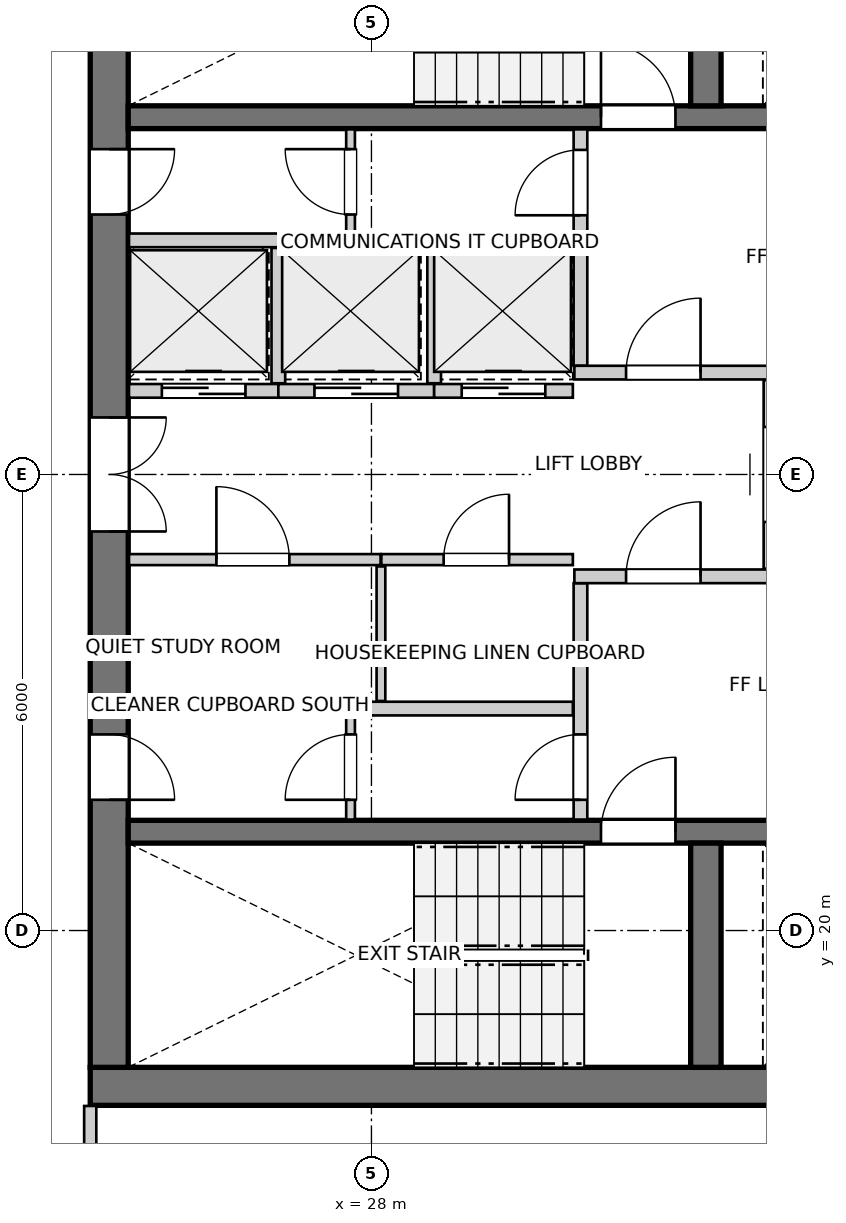
"""IFC4 building model, lengths in metres.
Left out: names, types, materials, properties, quantities, classifications, styles, units other than length and angle.
Written with IfcOpenShell. Run it as: python <this file> out.ifc"""

import sys

from ifc_helpers import new_model, si_unit, direction, frame, frame_2d, origin, place, context, subcontext, project, spatial, rectangle, extrude, source, transform, mapped, element, fill, save


model = new_model("IFC4")
c1 = context("Model", 3, precision=1e-05, world=origin(), true_north=direction((0.0, 1.0)))
c2 = subcontext(c1, "Body", "Model", "MODEL_VIEW")
j1 = project(units=[si_unit("LENGTHUNIT", "METRE"), si_unit("PLANEANGLEUNIT", "RADIAN")], contexts=[c1])
p1 = place(None, origin())
s1 = spatial("IfcSite", under=j1, at=p1, CompositionType="ELEMENT")
p2 = place(p1, origin())
s2 = spatial("IfcBuilding", under=s1, at=p2, CompositionType="ELEMENT")
p3 = place(p2, frame((0.0, 0.0, 208.4)))
s3 = spatial("IfcBuildingStorey", under=s2, at=p3, CompositionType="ELEMENT", Elevation=208.4)
p4 = place(p3, frame((24.3, 17.95, 0.0), z_axis=(0.0, 0.0, 1.0), x_axis=(1.0, 0.0, 0.0)))
e1 = element("IfcWall", 1, at=p4, inside=s3, PredefinedType="SHEAR", context=c2, shape_type="SweptSolid", body=[
    extrude(rectangle(XDim=12.1, YDim=0.5, at=frame_2d((6.05, 0.0))), origin(), (0.0, 0.0, 1.0), 2.935),
])
p5 = place(p3, frame((24.55, 33.8, 0.0), z_axis=(0.0, 0.0, 1.0), x_axis=(0.0, -1.0, 0.0)))
e2 = element("IfcWall", 2, at=p5, inside=s3, PredefinedType="SHEAR", context=c2, shape_type="SweptSolid", body=[
    extrude(rectangle(XDim=15.6, YDim=0.5, at=frame_2d((7.8, 0.0))), origin(), (0.0, 0.0, 1.0), 2.935),
])
p6 = place(p5, frame((7.05, 0.0, 0.0)))
e3 = element("IfcOpeningElement", 3, at=p6, cuts=e2, PredefinedType="OPENING", context=c2, shape_type="SweptSolid", body=[
    extrude(rectangle(XDim=1.5, YDim=2.15, at=frame_2d((0.75, 1.075))), frame((0.0, 0.26, 0.0), z_axis=(0.0, -1.0, 0.0), x_axis=(1.0, 0.0, 0.0)), (0.0, 0.0, 1.0), 0.52),
])
p7 = place(p5, frame((3.52, 0.0, 0.0)))
e4 = element("IfcOpeningElement", 4, at=p7, cuts=e2, PredefinedType="OPENING", context=c2, shape_type="SweptSolid", body=[
    extrude(rectangle(XDim=0.86, YDim=2.05, at=frame_2d((0.43, 1.025))), frame((0.0, 0.26, 0.0), z_axis=(0.0, -1.0, 0.0), x_axis=(1.0, 0.0, 0.0)), (0.0, 0.0, 1.0), 0.52),
])
p8 = place(p5, frame((11.22, 0.0, 0.0)))
e5 = element("IfcOpeningElement", 5, at=p8, cuts=e2, PredefinedType="OPENING", context=c2, shape_type="SweptSolid", body=[
    extrude(rectangle(XDim=0.86, YDim=2.05, at=frame_2d((0.43, 1.025))), frame((0.0, 0.26, 0.0), z_axis=(0.0, -1.0, 0.0), x_axis=(1.0, 0.0, 0.0)), (0.0, 0.0, 1.0), 0.52),
])
p9 = place(p3, frame((24.8, 21.3, 0.0), z_axis=(0.0, 0.0, 1.0), x_axis=(1.0, 0.0, 0.0)))
e6 = element("IfcWall", 6, at=p9, inside=s3, PredefinedType="SHEAR", context=c2, shape_type="SweptSolid", body=[
    extrude(rectangle(XDim=11.1, YDim=0.3, at=frame_2d((5.55, 0.0))), origin(), (0.0, 0.0, 1.0), 2.935),
])
p10 = place(p9, frame((6.22, 0.0, 0.0)))
e7 = element("IfcOpeningElement", 7, at=p10, cuts=e6, PredefinedType="OPENING", context=c2, shape_type="SweptSolid", body=[
    extrude(rectangle(XDim=0.98, YDim=2.15, at=frame_2d((0.49, 1.075))), frame((0.0, 0.16, 0.0), z_axis=(0.0, -1.0, 0.0), x_axis=(1.0, 0.0, 0.0)), (0.0, 0.0, 1.0), 0.32),
])
p11 = place(p9, frame((9.15, 0.0, 0.0)))
e8 = element("IfcOpeningElement", 8, at=p11, cuts=e6, PredefinedType="OPENING", context=c2, shape_type="SweptSolid", body=[
    extrude(rectangle(XDim=1.15, YDim=2.15, at=frame_2d((0.575, 1.075))), frame((0.0, 0.16, 0.0), z_axis=(0.0, -1.0, 0.0), x_axis=(1.0, 0.0, 0.0)), (0.0, 0.0, 1.0), 0.32),
])
p12 = place(p3, frame((32.4, 18.2, 0.0), z_axis=(0.0, 0.0, 1.0), x_axis=(0.0, 1.0, 0.0)))
e9 = element("IfcWall", 9, at=p12, inside=s3, PredefinedType="SHEAR", context=c2, shape_type="SweptSolid", body=[
    extrude(rectangle(XDim=2.95, YDim=0.4, at=frame_2d((1.475, 0.0))), origin(), (0.0, 0.0, 1.0), 2.935),
])
p13 = place(p3, frame((24.8, 30.7, 0.0), z_axis=(0.0, 0.0, 1.0), x_axis=(1.0, 0.0, 0.0)))
e10 = element("IfcWall", 10, at=p13, inside=s3, PredefinedType="SHEAR", context=c2, shape_type="SweptSolid", body=[
    extrude(rectangle(XDim=11.1, YDim=0.3, at=frame_2d((5.55, 0.0))), origin(), (0.0, 0.0, 1.0), 2.935),
])
p14 = place(p13, frame((6.22, 0.0, 0.0)))
e11 = element("IfcOpeningElement", 11, at=p14, cuts=e10, PredefinedType="OPENING", context=c2, shape_type="SweptSolid", body=[
    extrude(rectangle(XDim=0.98, YDim=2.15, at=frame_2d((0.49, 1.075))), frame((0.0, 0.16, 0.0), z_axis=(0.0, -1.0, 0.0), x_axis=(1.0, 0.0, 0.0)), (0.0, 0.0, 1.0), 0.32),
])
p15 = place(p13, frame((9.15, 0.0, 0.0)))
e12 = element("IfcOpeningElement", 12, at=p15, cuts=e10, PredefinedType="OPENING", context=c2, shape_type="SweptSolid", body=[
    extrude(rectangle(XDim=1.15, YDim=2.15, at=frame_2d((0.575, 1.075))), frame((0.0, 0.16, 0.0), z_axis=(0.0, -1.0, 0.0), x_axis=(1.0, 0.0, 0.0)), (0.0, 0.0, 1.0), 0.32),
])
p16 = place(p3, frame((32.4, 30.85, 0.0), z_axis=(0.0, 0.0, 1.0), x_axis=(0.0, 1.0, 0.0)))
e13 = element("IfcWall", 13, at=p16, inside=s3, PredefinedType="SHEAR", context=c2, shape_type="SweptSolid", body=[
    extrude(rectangle(XDim=2.95, YDim=0.4, at=frame_2d((1.475, 0.0))), origin(), (0.0, 0.0, 1.0), 2.935),
])
p17 = place(p3, frame((30.75, 21.46, 0.0), z_axis=(0.0, 0.0, 1.0), x_axis=(0.0, 1.0, 0.0)))
e14 = element("IfcWall", 14, at=p17, inside=s3, PredefinedType="PARTITIONING", context=c2, shape_type="SweptSolid", body=[
    extrude(rectangle(XDim=3.11, YDim=0.18, at=frame_2d((1.555, 0.0))), origin(), (0.0, 0.0, 1.0), 2.935),
])
p18 = place(p17, frame((0.26, 0.0, 0.0)))
e15 = element("IfcOpeningElement", 15, at=p18, cuts=e14, PredefinedType="OPENING", context=c2, shape_type="SweptSolid", body=[
    extrude(rectangle(XDim=0.86, YDim=2.05, at=frame_2d((0.43, 1.025))), frame((0.0, 0.1, 0.0), z_axis=(0.0, -1.0, 0.0), x_axis=(1.0, 0.0, 0.0)), (0.0, 0.0, 1.0), 0.2),
])
p19 = place(p3, frame((30.67, 24.66, 0.0), z_axis=(0.0, 0.0, 1.0), x_axis=(1.0, 0.0, 0.0)))
e16 = element("IfcWall", 16, at=p19, inside=s3, PredefinedType="PARTITIONING", context=c2, shape_type="SweptSolid", body=[
    extrude(rectangle(XDim=5.22, YDim=0.18, at=frame_2d((2.61, 0.0))), origin(), (0.0, 0.0, 1.0), 2.935),
])
p20 = place(p19, frame((0.68, 0.0, 0.0)))
e17 = element("IfcOpeningElement", 17, at=p20, cuts=e16, PredefinedType="OPENING", context=c2, shape_type="SweptSolid", body=[
    extrude(rectangle(XDim=0.98, YDim=2.15, at=frame_2d((0.49, 1.075))), frame((0.0, 0.1, 0.0), z_axis=(0.0, -1.0, 0.0), x_axis=(1.0, 0.0, 0.0)), (0.0, 0.0, 1.0), 0.2),
])
p21 = place(p3, frame((30.75, 27.43, 0.0), z_axis=(0.0, 0.0, 1.0), x_axis=(0.0, 1.0, 0.0)))
e18 = element("IfcWall", 18, at=p21, inside=s3, PredefinedType="PARTITIONING", context=c2, shape_type="SweptSolid", body=[
    extrude(rectangle(XDim=3.11, YDim=0.18, at=frame_2d((1.555, 0.0))), origin(), (0.0, 0.0, 1.0), 2.935),
])
p22 = place(p21, frame((1.98, 0.0, 0.0)))
e19 = element("IfcOpeningElement", 19, at=p22, cuts=e18, PredefinedType="OPENING", context=c2, shape_type="SweptSolid", body=[
    extrude(rectangle(XDim=0.86, YDim=2.05, at=frame_2d((0.43, 1.025))), frame((0.0, 0.1, 0.0), z_axis=(0.0, -1.0, 0.0), x_axis=(1.0, 0.0, 0.0)), (0.0, 0.0, 1.0), 0.2),
])
p23 = place(p3, frame((30.67, 27.34, 0.0), z_axis=(0.0, 0.0, 1.0), x_axis=(1.0, 0.0, 0.0)))
e20 = element("IfcWall", 20, at=p23, inside=s3, PredefinedType="PARTITIONING", context=c2, shape_type="SweptSolid", body=[
    extrude(rectangle(XDim=5.22, YDim=0.18, at=frame_2d((2.61, 0.0))), origin(), (0.0, 0.0, 1.0), 2.935),
])
p24 = place(p23, frame((0.68, 0.0, 0.0)))
e21 = element("IfcOpeningElement", 21, at=p24, cuts=e20, PredefinedType="OPENING", context=c2, shape_type="SweptSolid", body=[
    extrude(rectangle(XDim=0.98, YDim=2.15, at=frame_2d((0.49, 1.075))), frame((0.0, 0.1, 0.0), z_axis=(0.0, -1.0, 0.0), x_axis=(1.0, 0.0, 0.0)), (0.0, 0.0, 1.0), 0.2),
])
p25 = place(p3, frame((33.25, 24.76, 0.0), z_axis=(0.0, 0.0, 1.0), x_axis=(0.0, 1.0, 0.0)))
e22 = element("IfcWall", 22, at=p25, inside=s3, PredefinedType="PARTITIONING", context=c2, shape_type="SweptSolid", body=[
    extrude(rectangle(XDim=2.48, YDim=0.18, at=frame_2d((1.24, 0.0))), origin(), (0.0, 0.0, 1.0), 2.935),
])
p26 = place(p25, frame((0.615, 0.0, 0.0)))
e23 = element("IfcOpeningElement", 23, at=p26, cuts=e22, PredefinedType="OPENING", context=c2, shape_type="SweptSolid", body=[
    extrude(rectangle(XDim=1.25, YDim=2.15, at=frame_2d((0.625, 1.075))), frame((0.0, 0.1, 0.0), z_axis=(0.0, -1.0, 0.0), x_axis=(1.0, 0.0, 0.0)), (0.0, 0.0, 1.0), 0.2),
])
p27 = place(p3, frame((24.81, 22.92, 0.0), z_axis=(0.0, 0.0, 1.0), x_axis=(1.0, 0.0, 0.0)))
e24 = element("IfcWall", 24, at=p27, inside=s3, PredefinedType="PARTITIONING", context=c2, shape_type="SweptSolid", body=[
    extrude(rectangle(XDim=5.84, YDim=0.18, at=frame_2d((2.92, 0.0))), origin(), (0.0, 0.0, 1.0), 2.935),
])
p28 = place(p3, frame((24.81, 24.88, 0.0), z_axis=(0.0, 0.0, 1.0), x_axis=(1.0, 0.0, 0.0)))
e25 = element("IfcWall", 25, at=p28, inside=s3, PredefinedType="PARTITIONING", context=c2, shape_type="SweptSolid", body=[
    extrude(rectangle(XDim=3.31, YDim=0.145, at=frame_2d((1.655, 0.0))), origin(), (0.0, 0.0, 1.0), 2.935),
])
p29 = place(p28, frame((1.15, 0.0, 0.0)))
e26 = element("IfcOpeningElement", 26, at=p29, cuts=e25, PredefinedType="OPENING", context=c2, shape_type="SweptSolid", body=[
    extrude(rectangle(XDim=0.96, YDim=2.1, at=frame_2d((0.48, 1.05))), frame((0.0, 0.083, 0.0), z_axis=(0.0, -1.0, 0.0), x_axis=(1.0, 0.0, 0.0)), (0.0, 0.0, 1.0), 0.165),
])
p30 = place(p3, frame((28.13, 24.88, 0.0), z_axis=(0.0, 0.0, 1.0), x_axis=(1.0, 0.0, 0.0)))
e27 = element("IfcWall", 27, at=p30, inside=s3, PredefinedType="PARTITIONING", context=c2, shape_type="SweptSolid", body=[
    extrude(rectangle(XDim=2.52, YDim=0.145, at=frame_2d((1.26, 0.0))), origin(), (0.0, 0.0, 1.0), 2.935),
])
p31 = place(p30, frame((0.82, 0.0, 0.0)))
e28 = element("IfcOpeningElement", 28, at=p31, cuts=e27, PredefinedType="OPENING", context=c2, shape_type="SweptSolid", body=[
    extrude(rectangle(XDim=0.86, YDim=2.05, at=frame_2d((0.43, 1.025))), frame((0.0, 0.083, 0.0), z_axis=(0.0, -1.0, 0.0), x_axis=(1.0, 0.0, 0.0)), (0.0, 0.0, 1.0), 0.165),
])
p32 = place(p3, frame((28.125, 23.02, 0.0), z_axis=(0.0, 0.0, 1.0), x_axis=(0.0, 1.0, 0.0)))
e29 = element("IfcWall", 29, at=p32, inside=s3, PredefinedType="PARTITIONING", context=c2, shape_type="SweptSolid", body=[
    extrude(rectangle(XDim=1.77, YDim=0.115, at=frame_2d((0.885, 0.0))), origin(), (0.0, 0.0, 1.0), 2.935),
])
p33 = place(p3, frame((24.81, 29.08, 0.0), z_axis=(0.0, 0.0, 1.0), x_axis=(1.0, 0.0, 0.0)))
e30 = element("IfcWall", 30, at=p33, inside=s3, PredefinedType="PARTITIONING", context=c2, shape_type="SweptSolid", body=[
    extrude(rectangle(XDim=5.84, YDim=0.18, at=frame_2d((2.92, 0.0))), origin(), (0.0, 0.0, 1.0), 2.935),
])
p34 = place(p3, frame((24.81, 27.1, 0.0), z_axis=(0.0, 0.0, 1.0), x_axis=(1.0, 0.0, 0.0)))
e31 = element("IfcWall", 31, at=p34, inside=s3, PredefinedType="PARTITIONING", context=c2, shape_type="SweptSolid", body=[
    extrude(rectangle(XDim=1.965, YDim=0.18, at=frame_2d((0.982, 0.0))), origin(), (0.0, 0.0, 1.0), 2.935),
])
p35 = place(p34, frame((0.433, 0.0, 0.0)))
e32 = element("IfcOpeningElement", 32, at=p35, cuts=e31, PredefinedType="OPENING", context=c2, shape_type="SweptSolid", body=[
    extrude(rectangle(XDim=1.1, YDim=2.15, at=frame_2d((0.55, 1.075))), frame((0.0, 0.1, 0.0), z_axis=(0.0, -1.0, 0.0), x_axis=(1.0, 0.0, 0.0)), (0.0, 0.0, 1.0), 0.2),
])
p36 = place(p3, frame((26.775, 27.1, 0.0), z_axis=(0.0, 0.0, 1.0), x_axis=(1.0, 0.0, 0.0)))
e33 = element("IfcWall", 33, at=p36, inside=s3, PredefinedType="PARTITIONING", context=c2, shape_type="SweptSolid", body=[
    extrude(rectangle(XDim=2.05, YDim=0.18, at=frame_2d((1.025, 0.0))), origin(), (0.0, 0.0, 1.0), 2.935),
])
p37 = place(p36, frame((0.475, 0.0, 0.0)))
e34 = element("IfcOpeningElement", 34, at=p37, cuts=e33, PredefinedType="OPENING", context=c2, shape_type="SweptSolid", body=[
    extrude(rectangle(XDim=1.1, YDim=2.15, at=frame_2d((0.55, 1.075))), frame((0.0, 0.1, 0.0), z_axis=(0.0, -1.0, 0.0), x_axis=(1.0, 0.0, 0.0)), (0.0, 0.0, 1.0), 0.2),
])
p38 = place(p3, frame((26.775, 27.2, 0.0), z_axis=(0.0, 0.0, 1.0), x_axis=(0.0, 1.0, 0.0)))
e35 = element("IfcWall", 35, at=p38, inside=s3, PredefinedType="PARTITIONING", context=c2, shape_type="SweptSolid", body=[
    extrude(rectangle(XDim=1.78, YDim=0.18, at=frame_2d((0.89, 0.0))), origin(), (0.0, 0.0, 1.0), 2.935),
])
p39 = place(p3, frame((28.825, 27.1, 0.0), z_axis=(0.0, 0.0, 1.0), x_axis=(1.0, 0.0, 0.0)))
e36 = element("IfcWall", 36, at=p39, inside=s3, PredefinedType="PARTITIONING", context=c2, shape_type="SweptSolid", body=[
    extrude(rectangle(XDim=1.825, YDim=0.18, at=frame_2d((0.913, 0.0))), origin(), (0.0, 0.0, 1.0), 2.935),
])
p40 = place(p39, frame((0.363, 0.0, 0.0)))
e37 = element("IfcOpeningElement", 37, at=p40, cuts=e36, PredefinedType="OPENING", context=c2, shape_type="SweptSolid", body=[
    extrude(rectangle(XDim=1.1, YDim=2.15, at=frame_2d((0.55, 1.075))), frame((0.0, 0.1, 0.0), z_axis=(0.0, -1.0, 0.0), x_axis=(1.0, 0.0, 0.0)), (0.0, 0.0, 1.0), 0.2),
])
p41 = place(p3, frame((28.825, 27.2, 0.0), z_axis=(0.0, 0.0, 1.0), x_axis=(0.0, 1.0, 0.0)))
e38 = element("IfcWall", 38, at=p41, inside=s3, PredefinedType="PARTITIONING", context=c2, shape_type="SweptSolid", body=[
    extrude(rectangle(XDim=1.78, YDim=0.18, at=frame_2d((0.89, 0.0))), origin(), (0.0, 0.0, 1.0), 2.935),
])
p42 = place(p3, frame((27.725, 21.46, 0.0), z_axis=(0.0, 0.0, 1.0), x_axis=(0.0, 1.0, 0.0)))
e39 = element("IfcWall", 39, at=p42, inside=s3, PredefinedType="PARTITIONING", context=c2, shape_type="SweptSolid", body=[
    extrude(rectangle(XDim=1.38, YDim=0.115, at=frame_2d((0.69, 0.0))), origin(), (0.0, 0.0, 1.0), 2.935),
])
p43 = place(p42, frame((0.26, 0.0, 0.0)))
e40 = element("IfcOpeningElement", 40, at=p43, cuts=e39, PredefinedType="OPENING", context=c2, shape_type="SweptSolid", body=[
    extrude(rectangle(XDim=0.86, YDim=2.05, at=frame_2d((0.43, 1.025))), frame((0.0, 0.067, 0.0), z_axis=(0.0, -1.0, 0.0), x_axis=(1.0, 0.0, 0.0)), (0.0, 0.0, 1.0), 0.135),
])
p44 = place(p3, frame((27.725, 29.16, 0.0), z_axis=(0.0, 0.0, 1.0), x_axis=(0.0, 1.0, 0.0)))
e41 = element("IfcWall", 41, at=p44, inside=s3, PredefinedType="PARTITIONING", context=c2, shape_type="SweptSolid", body=[
    extrude(rectangle(XDim=1.38, YDim=0.115, at=frame_2d((0.69, 0.0))), origin(), (0.0, 0.0, 1.0), 2.935),
])
p45 = place(p44, frame((0.26, 0.0, 0.0)))
e42 = element("IfcOpeningElement", 42, at=p45, cuts=e41, PredefinedType="OPENING", context=c2, shape_type="SweptSolid", body=[
    extrude(rectangle(XDim=0.86, YDim=2.05, at=frame_2d((0.43, 1.025))), frame((0.0, 0.067, 0.0), z_axis=(0.0, -1.0, 0.0), x_axis=(1.0, 0.0, 0.0)), (0.0, 0.0, 1.0), 0.135),
])
p46 = place(p3, frame((24.3, 15.002, 0.0), z_axis=(0.0, 0.0, 1.0), x_axis=(0.0, 1.0, 0.0)))
e43 = element("IfcWall", 43, at=p46, inside=s3, PredefinedType="PARTITIONING", context=c2, shape_type="SweptSolid", body=[
    extrude(rectangle(XDim=2.69, YDim=0.16, at=frame_2d((1.345, 0.0))), origin(), (0.0, 0.0, 1.0), 2.935),
])
m1 = source(origin(), c2, "Body", "SweptSolid", [
    extrude(rectangle(XDim=0.98, YDim=2.15, at=frame_2d((0.49, 1.075))), frame((0.0, 0.025, 0.0), z_axis=(0.0, -1.0, 0.0), x_axis=(1.0, 0.0, 0.0)), (0.0, 0.0, 1.0), 0.05),
])
p47 = place(p10, origin())
e44 = element("IfcDoor", 44, at=p47, inside=s3, OperationType="SINGLE_SWING_RIGHT", PredefinedType="DOOR", context=c2, shape_type="MappedRepresentation", body=[
    mapped(m1, transform((0.0, 0.0, 0.0), x_axis=(1.0, 0.0, 0.0), y_axis=(0.0, 1.0, 0.0), z_axis=(0.0, 0.0, 1.0), scale=1.0)),
])
fill(e7, e44)
p48 = place(p14, origin())
e45 = element("IfcDoor", 45, at=p48, inside=s3, OperationType="SINGLE_SWING_LEFT", PredefinedType="DOOR", context=c2, shape_type="MappedRepresentation", body=[
    mapped(m1, transform((0.0, 0.0, 0.0), x_axis=(1.0, 0.0, 0.0), y_axis=(0.0, 1.0, 0.0), z_axis=(0.0, 0.0, 1.0), scale=1.0)),
])
fill(e11, e45)
m2 = source(origin(), c2, "Body", "SweptSolid", [
    extrude(rectangle(XDim=1.5, YDim=2.15, at=frame_2d((0.75, 1.075))), frame((0.0, 0.025, 0.0), z_axis=(0.0, -1.0, 0.0), x_axis=(1.0, 0.0, 0.0)), (0.0, 0.0, 1.0), 0.05),
])
p49 = place(p6, origin())
e46 = element("IfcDoor", 46, at=p49, inside=s3, OperationType="DOUBLE_DOOR_SINGLE_SWING", PredefinedType="DOOR", context=c2, shape_type="MappedRepresentation", body=[
    mapped(m2, transform((0.0, 0.0, 0.0), x_axis=(1.0, 0.0, 0.0), y_axis=(0.0, 1.0, 0.0), z_axis=(0.0, 0.0, 1.0), scale=1.0)),
])
fill(e3, e46)
m3 = source(origin(), c2, "Body", "SweptSolid", [
    extrude(rectangle(XDim=0.86, YDim=2.05, at=frame_2d((0.43, 1.025))), frame((0.0, 0.025, 0.0), z_axis=(0.0, -1.0, 0.0), x_axis=(1.0, 0.0, 0.0)), (0.0, 0.0, 1.0), 0.05),
])
p50 = place(p7, origin())
e47 = element("IfcDoor", 47, at=p50, inside=s3, OperationType="SINGLE_SWING_LEFT", PredefinedType="DOOR", context=c2, shape_type="MappedRepresentation", body=[
    mapped(m3, transform((0.0, 0.0, 0.0), x_axis=(1.0, 0.0, 0.0), y_axis=(0.0, 1.0, 0.0), z_axis=(0.0, 0.0, 1.0), scale=1.0)),
])
fill(e4, e47)
p51 = place(p8, origin())
e48 = element("IfcDoor", 48, at=p51, inside=s3, OperationType="SINGLE_SWING_RIGHT", PredefinedType="DOOR", context=c2, shape_type="MappedRepresentation", body=[
    mapped(m3, transform((0.0, 0.0, 0.0), x_axis=(1.0, 0.0, 0.0), y_axis=(0.0, 1.0, 0.0), z_axis=(0.0, 0.0, 1.0), scale=1.0)),
])
fill(e5, e48)
p52 = place(p18, origin())
e49 = element("IfcDoor", 49, at=p52, inside=s3, OperationType="SINGLE_SWING_LEFT", PredefinedType="DOOR", context=c2, shape_type="MappedRepresentation", body=[
    mapped(m3, transform((0.0, 0.0, 0.0), x_axis=(1.0, 0.0, 0.0), y_axis=(0.0, 1.0, 0.0), z_axis=(0.0, 0.0, 1.0), scale=1.0)),
])
fill(e15, e49)
p53 = place(p20, origin())
e50 = element("IfcDoor", 50, at=p53, inside=s3, OperationType="SINGLE_SWING_RIGHT", PredefinedType="DOOR", context=c2, shape_type="MappedRepresentation", body=[
    mapped(m1, transform((0.0, 0.0, 0.0), x_axis=(1.0, 0.0, 0.0), y_axis=(0.0, 1.0, 0.0), z_axis=(0.0, 0.0, 1.0), scale=1.0)),
])
fill(e17, e50)
p54 = place(p22, origin())
e51 = element("IfcDoor", 51, at=p54, inside=s3, OperationType="SINGLE_SWING_LEFT", PredefinedType="DOOR", context=c2, shape_type="MappedRepresentation", body=[
    mapped(m3, transform((0.0, 0.0, 0.0), x_axis=(1.0, 0.0, 0.0), y_axis=(0.0, 1.0, 0.0), z_axis=(0.0, 0.0, 1.0), scale=1.0)),
])
fill(e19, e51)
p55 = place(p24, origin())
e52 = element("IfcDoor", 52, at=p55, inside=s3, OperationType="SINGLE_SWING_RIGHT", PredefinedType="DOOR", context=c2, shape_type="MappedRepresentation", body=[
    mapped(m1, transform((0.0, 0.0, 0.0), x_axis=(1.0, 0.0, 0.0), y_axis=(0.0, 1.0, 0.0), z_axis=(0.0, 0.0, 1.0), scale=1.0)),
])
fill(e21, e52)
m4 = source(origin(), c2, "Body", "SweptSolid", [
    extrude(rectangle(XDim=0.96, YDim=2.1, at=frame_2d((0.48, 1.05))), frame((0.0, 0.025, 0.0), z_axis=(0.0, -1.0, 0.0), x_axis=(1.0, 0.0, 0.0)), (0.0, 0.0, 1.0), 0.05),
])
p56 = place(p29, origin())
e53 = element("IfcDoor", 53, at=p56, inside=s3, OperationType="SINGLE_SWING_LEFT", PredefinedType="DOOR", context=c2, shape_type="MappedRepresentation", body=[
    mapped(m4, transform((0.0, 0.0, 0.0), x_axis=(1.0, 0.0, 0.0), y_axis=(0.0, 1.0, 0.0), z_axis=(0.0, 0.0, 1.0), scale=1.0)),
])
fill(e26, e53)
p57 = place(p31, origin())
e54 = element("IfcDoor", 54, at=p57, inside=s3, OperationType="SINGLE_SWING_RIGHT", PredefinedType="DOOR", context=c2, shape_type="MappedRepresentation", body=[
    mapped(m3, transform((0.0, 0.0, 0.0), x_axis=(1.0, 0.0, 0.0), y_axis=(0.0, 1.0, 0.0), z_axis=(0.0, 0.0, 1.0), scale=1.0)),
])
fill(e28, e54)
m5 = source(origin(), c2, "Body", "SweptSolid", [
    extrude(rectangle(XDim=1.1, YDim=2.15, at=frame_2d((0.55, 1.075))), frame((0.0, 0.025, 0.0), z_axis=(0.0, -1.0, 0.0), x_axis=(1.0, 0.0, 0.0)), (0.0, 0.0, 1.0), 0.05),
])
p58 = place(p35, origin())
e55 = element("IfcDoor", 55, at=p58, inside=s3, OperationType="DOUBLE_DOOR_SLIDING", PredefinedType="DOOR", context=c2, shape_type="MappedRepresentation", body=[
    mapped(m5, transform((0.0, 0.0, 0.0), x_axis=(1.0, 0.0, 0.0), y_axis=(0.0, 1.0, 0.0), z_axis=(0.0, 0.0, 1.0), scale=1.0)),
])
fill(e32, e55)
p59 = place(p37, origin())
e56 = element("IfcDoor", 56, at=p59, inside=s3, OperationType="DOUBLE_DOOR_SLIDING", PredefinedType="DOOR", context=c2, shape_type="MappedRepresentation", body=[
    mapped(m5, transform((0.0, 0.0, 0.0), x_axis=(1.0, 0.0, 0.0), y_axis=(0.0, 1.0, 0.0), z_axis=(0.0, 0.0, 1.0), scale=1.0)),
])
fill(e34, e56)
p60 = place(p40, origin())
e57 = element("IfcDoor", 57, at=p60, inside=s3, OperationType="DOUBLE_DOOR_SLIDING", PredefinedType="DOOR", context=c2, shape_type="MappedRepresentation", body=[
    mapped(m5, transform((0.0, 0.0, 0.0), x_axis=(1.0, 0.0, 0.0), y_axis=(0.0, 1.0, 0.0), z_axis=(0.0, 0.0, 1.0), scale=1.0)),
])
fill(e37, e57)
p61 = place(p43, origin())
e58 = element("IfcDoor", 58, at=p61, inside=s3, OperationType="SINGLE_SWING_LEFT", PredefinedType="DOOR", context=c2, shape_type="MappedRepresentation", body=[
    mapped(m3, transform((0.0, 0.0, 0.0), x_axis=(1.0, 0.0, 0.0), y_axis=(0.0, 1.0, 0.0), z_axis=(0.0, 0.0, 1.0), scale=1.0)),
])
fill(e40, e58)
p62 = place(p45, origin())
e59 = element("IfcDoor", 59, at=p62, inside=s3, OperationType="SINGLE_SWING_RIGHT", PredefinedType="DOOR", context=c2, shape_type="MappedRepresentation", body=[
    mapped(m3, transform((0.0, 0.0, 0.0), x_axis=(1.0, 0.0, 0.0), y_axis=(0.0, 1.0, 0.0), z_axis=(0.0, 0.0, 1.0), scale=1.0)),
])
fill(e42, e59)
save(model, sys.argv[1])
